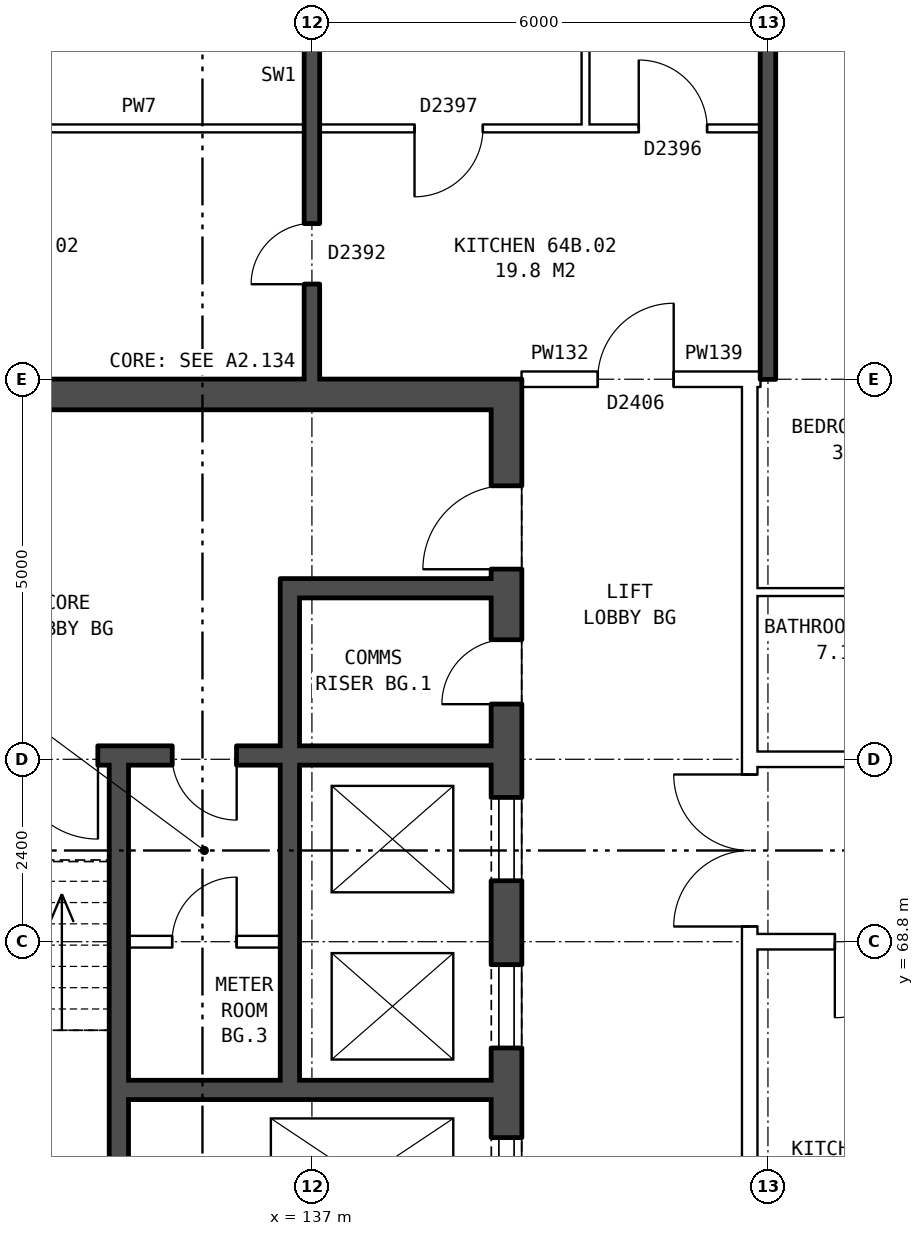
"""IFC4 building model, lengths in metres.
Left out: names, types, materials, properties, quantities, classifications, styles, units other than length and angle.
Written with IfcOpenShell. Run it as: python <this file> out.ifc"""

import sys

from ifc_helpers import new_model, si_unit, direction, frame, frame_2d, origin, place, context, subcontext, project, spatial, rectangle, extrude, element, fill, save


model = new_model("IFC4")
c1 = context("Model", 3, precision=1e-05, world=origin(), true_north=direction((0.0, 1.0)))
c2 = subcontext(c1, "Body", "Model", "MODEL_VIEW")
j1 = project(units=[si_unit("LENGTHUNIT", "METRE"), si_unit("PLANEANGLEUNIT", "RADIAN")], contexts=[c1])
p1 = place(None, origin())
s1 = spatial("IfcSite", under=j1, at=p1, CompositionType="ELEMENT")
p2 = place(p1, origin())
s2 = spatial("IfcBuilding", under=s1, at=p2, CompositionType="ELEMENT")
p3 = place(p2, frame((0.0, 0.0, 227.6)))
s3 = spatial("IfcBuildingStorey", under=s2, at=p3, CompositionType="ELEMENT", Elevation=227.6)
p4 = place(p3, frame((139.56, 63.8, 0.0), z_axis=(0.0, 0.0, 1.0), x_axis=(0.0, 1.0, 0.0)))
e1 = element("IfcWall", 1, at=p4, inside=s3, PredefinedType="SHEAR", context=c2, shape_type="SweptSolid", body=[
    extrude(rectangle(XDim=12.4, YDim=0.4, at=frame_2d((6.2, 0.0))), origin(), (0.0, 0.0, 1.0), 2.85),
])
p5 = place(p4, frame((1.325, 0.0, 0.0)))
e2 = element("IfcOpeningElement", 2, at=p5, cuts=e1, PredefinedType="OPENING", context=c2, shape_type="SweptSolid", body=[
    extrude(rectangle(XDim=1.1, YDim=2.1, at=frame_2d((0.55, 1.05))), frame((0.0, 0.21, 0.0), z_axis=(0.0, -1.0, 0.0), x_axis=(1.0, 0.0, 0.0)), (0.0, 0.0, 1.0), 0.42),
])
p6 = place(p4, frame((3.6, 0.0, 0.0)))
e3 = element("IfcOpeningElement", 3, at=p6, cuts=e1, PredefinedType="OPENING", context=c2, shape_type="SweptSolid", body=[
    extrude(rectangle(XDim=1.1, YDim=2.1, at=frame_2d((0.55, 1.05))), frame((0.0, 0.21, 0.0), z_axis=(0.0, -1.0, 0.0), x_axis=(1.0, 0.0, 0.0)), (0.0, 0.0, 1.0), 0.42),
])
p7 = place(p4, frame((5.8, 0.0, 0.0)))
e4 = element("IfcOpeningElement", 4, at=p7, cuts=e1, PredefinedType="OPENING", context=c2, shape_type="SweptSolid", body=[
    extrude(rectangle(XDim=1.1, YDim=2.1, at=frame_2d((0.55, 1.05))), frame((0.0, 0.21, 0.0), z_axis=(0.0, -1.0, 0.0), x_axis=(1.0, 0.0, 0.0)), (0.0, 0.0, 1.0), 0.42),
])
p8 = place(p4, frame((9.9, 0.0, 0.0)))
e5 = element("IfcOpeningElement", 5, at=p8, cuts=e1, PredefinedType="OPENING", context=c2, shape_type="SweptSolid", body=[
    extrude(rectangle(XDim=1.1, YDim=2.1, at=frame_2d((0.55, 1.05))), frame((0.0, 0.21, 0.0), z_axis=(0.0, -1.0, 0.0), x_axis=(1.0, 0.0, 0.0)), (0.0, 0.0, 1.0), 0.42),
])
p9 = place(p4, frame((8.125, 0.0, 0.0)))
e6 = element("IfcOpeningElement", 6, at=p9, cuts=e1, PredefinedType="OPENING", context=c2, shape_type="SweptSolid", body=[
    extrude(rectangle(XDim=0.85, YDim=2.1, at=frame_2d((0.425, 1.05))), frame((0.0, 0.21, 0.0), z_axis=(0.0, -1.0, 0.0), x_axis=(1.0, 0.0, 0.0)), (0.0, 0.0, 1.0), 0.42),
])
p10 = place(p3, frame((139.36, 76.0, 0.0), z_axis=(0.0, 0.0, 1.0), x_axis=(-1.0, 0.0, 0.0)))
e7 = element("IfcWall", 7, at=p10, inside=s3, PredefinedType="SHEAR", context=c2, shape_type="SweptSolid", body=[
    extrude(rectangle(XDim=7.6, YDim=0.4, at=frame_2d((3.8, 0.0))), origin(), (0.0, 0.0, 1.0), 2.85),
])
p11 = place(p3, frame((139.36, 66.85, 0.0), z_axis=(0.0, 0.0, 1.0), x_axis=(-1.0, 0.0, 0.0)))
e8 = element("IfcWall", 8, at=p11, inside=s3, PredefinedType="SHEAR", context=c2, shape_type="SweptSolid", body=[
    extrude(rectangle(XDim=4.775, YDim=0.25, at=frame_2d((2.388, 0.0))), origin(), (0.0, 0.0, 1.0), 2.85),
])
p12 = place(p3, frame((136.585, 68.8, 0.0), z_axis=(0.0, 0.0, 1.0), x_axis=(-1.0, 0.0, 0.0)))
e9 = element("IfcWall", 9, at=p12, inside=s3, PredefinedType="PARTITIONING", context=c2, shape_type="SweptSolid", body=[
    extrude(rectangle(XDim=2.0, YDim=0.15, at=frame_2d((1.0, 0.0))), origin(), (0.0, 0.0, 1.0), 2.85),
])
p13 = place(p12, frame((0.575, 0.0, 0.0)))
e10 = element("IfcOpeningElement", 10, at=p13, cuts=e9, PredefinedType="OPENING", context=c2, shape_type="SweptSolid", body=[
    extrude(rectangle(XDim=0.85, YDim=2.1, at=frame_2d((0.425, 1.05))), frame((0.0, 0.085, 0.0), z_axis=(0.0, -1.0, 0.0), x_axis=(1.0, 0.0, 0.0)), (0.0, 0.0, 1.0), 0.17),
])
p14 = place(p3, frame((139.36, 71.25, 0.0), z_axis=(0.0, 0.0, 1.0), x_axis=(-1.0, 0.0, 0.0)))
e11 = element("IfcWall", 11, at=p14, inside=s3, PredefinedType="SHEAR", context=c2, shape_type="SweptSolid", body=[
    extrude(rectangle(XDim=7.6, YDim=0.25, at=frame_2d((3.8, 0.0))), origin(), (0.0, 0.0, 1.0), 2.85),
])
p15 = place(p14, frame((5.175, 0.0, 0.0)))
e12 = element("IfcOpeningElement", 12, at=p15, cuts=e11, PredefinedType="OPENING", context=c2, shape_type="SweptSolid", body=[
    extrude(rectangle(XDim=1.1, YDim=2.1, at=frame_2d((0.55, 1.05))), frame((0.0, 0.135, 0.0), z_axis=(0.0, -1.0, 0.0), x_axis=(1.0, 0.0, 0.0)), (0.0, 0.0, 1.0), 0.27),
])
p16 = place(p14, frame((3.35, 0.0, 0.0)))
e13 = element("IfcOpeningElement", 13, at=p16, cuts=e11, PredefinedType="OPENING", context=c2, shape_type="SweptSolid", body=[
    extrude(rectangle(XDim=0.85, YDim=2.1, at=frame_2d((0.425, 1.05))), frame((0.0, 0.135, 0.0), z_axis=(0.0, -1.0, 0.0), x_axis=(1.0, 0.0, 0.0)), (0.0, 0.0, 1.0), 0.27),
])
p17 = place(p3, frame((139.36, 73.45, 0.0), z_axis=(0.0, 0.0, 1.0), x_axis=(-1.0, 0.0, 0.0)))
e14 = element("IfcWall", 14, at=p17, inside=s3, PredefinedType="SHEAR", context=c2, shape_type="SweptSolid", body=[
    extrude(rectangle(XDim=2.525, YDim=0.25, at=frame_2d((1.263, 0.0))), origin(), (0.0, 0.0, 1.0), 2.85),
])
p18 = place(p3, frame((136.71, 66.975, 0.0), z_axis=(0.0, 0.0, 1.0), x_axis=(0.0, 1.0, 0.0)))
e15 = element("IfcWall", 15, at=p18, inside=s3, PredefinedType="SHEAR", context=c2, shape_type="SweptSolid", body=[
    extrude(rectangle(XDim=4.15, YDim=0.25, at=frame_2d((2.075, 0.0))), origin(), (0.0, 0.0, 1.0), 2.85),
])
p19 = place(p3, frame((136.71, 71.375, 0.0), z_axis=(0.0, 0.0, 1.0), x_axis=(0.0, 1.0, 0.0)))
e16 = element("IfcWall", 16, at=p19, inside=s3, PredefinedType="SHEAR", context=c2, shape_type="SweptSolid", body=[
    extrude(rectangle(XDim=2.2, YDim=0.25, at=frame_2d((1.1, 0.0))), origin(), (0.0, 0.0, 1.0), 2.85),
])
p20 = place(p3, frame((134.46, 64.2, 0.0), z_axis=(0.0, 0.0, 1.0), x_axis=(0.0, 1.0, 0.0)))
e17 = element("IfcWall", 17, at=p20, inside=s3, PredefinedType="SHEAR", context=c2, shape_type="SweptSolid", body=[
    extrude(rectangle(XDim=6.925, YDim=0.25, at=frame_2d((3.462, 0.0))), origin(), (0.0, 0.0, 1.0), 2.85),
])
p21 = place(p3, frame((142.76, 63.9, 0.0), z_axis=(0.0, 0.0, 1.0), x_axis=(0.0, 1.0, 0.0)))
e18 = element("IfcWall", 18, at=p21, inside=s3, PredefinedType="PARTITIONING", context=c2, shape_type="SweptSolid", body=[
    extrude(rectangle(XDim=12.2, YDim=0.2, at=frame_2d((6.1, 0.0))), origin(), (0.0, 0.0, 1.0), 2.85),
])
p22 = place(p21, frame((5.1, 0.0, 0.0)))
e19 = element("IfcOpeningElement", 19, at=p22, cuts=e18, PredefinedType="OPENING", context=c2, shape_type="SweptSolid", body=[
    extrude(rectangle(XDim=2.0, YDim=2.1, at=frame_2d((1.0, 1.05))), frame((0.0, 0.11, 0.0), z_axis=(0.0, -1.0, 0.0), x_axis=(1.0, 0.0, 0.0)), (0.0, 0.0, 1.0), 0.22),
])
p23 = place(p3, frame((142.76, 68.8, 0.0), z_axis=(0.0, 0.0, 1.0), x_axis=(1.0, 0.0, 0.0)))
e20 = element("IfcWall", 20, at=p23, inside=s3, PredefinedType="PARTITIONING", context=c2, shape_type="SweptSolid", body=[
    extrude(rectangle(XDim=14.48, YDim=0.2, at=frame_2d((7.24, 0.0))), origin(), (0.0, 0.0, 1.0), 2.85),
])
p24 = place(p23, frame((1.12, 0.0, 0.0)))
e21 = element("IfcOpeningElement", 21, at=p24, cuts=e20, PredefinedType="OPENING", context=c2, shape_type="SweptSolid", body=[
    extrude(rectangle(XDim=1.0, YDim=2.1, at=frame_2d((0.5, 1.05))), frame((0.0, 0.11, 0.0), z_axis=(0.0, -1.0, 0.0), x_axis=(1.0, 0.0, 0.0)), (0.0, 0.0, 1.0), 0.22),
])
p25 = place(p23, frame((10.24, 0.0, 0.0)))
e22 = element("IfcOpeningElement", 22, at=p25, cuts=e20, PredefinedType="OPENING", context=c2, shape_type="SweptSolid", body=[
    extrude(rectangle(XDim=1.0, YDim=2.1, at=frame_2d((0.5, 1.05))), frame((0.0, 0.11, 0.0), z_axis=(0.0, -1.0, 0.0), x_axis=(1.0, 0.0, 0.0)), (0.0, 0.0, 1.0), 0.22),
])
p26 = place(p3, frame((142.76, 71.2, 0.0), z_axis=(0.0, 0.0, 1.0), x_axis=(1.0, 0.0, 0.0)))
e23 = element("IfcWall", 23, at=p26, inside=s3, PredefinedType="PARTITIONING", context=c2, shape_type="SweptSolid", body=[
    extrude(rectangle(XDim=14.48, YDim=0.2, at=frame_2d((7.24, 0.0))), origin(), (0.0, 0.0, 1.0), 2.85),
])
p27 = place(p26, frame((4.24, 0.0, 0.0)))
e24 = element("IfcOpeningElement", 24, at=p27, cuts=e23, PredefinedType="OPENING", context=c2, shape_type="SweptSolid", body=[
    extrude(rectangle(XDim=1.0, YDim=2.1, at=frame_2d((0.5, 1.05))), frame((0.0, 0.11, 0.0), z_axis=(0.0, -1.0, 0.0), x_axis=(1.0, 0.0, 0.0)), (0.0, 0.0, 1.0), 0.22),
])
p28 = place(p26, frame((10.24, 0.0, 0.0)))
e25 = element("IfcOpeningElement", 25, at=p28, cuts=e23, PredefinedType="OPENING", context=c2, shape_type="SweptSolid", body=[
    extrude(rectangle(XDim=1.0, YDim=2.1, at=frame_2d((0.5, 1.05))), frame((0.0, 0.11, 0.0), z_axis=(0.0, -1.0, 0.0), x_axis=(1.0, 0.0, 0.0)), (0.0, 0.0, 1.0), 0.22),
])
p29 = place(p3, frame((142.76, 73.4, 0.0), z_axis=(0.0, 0.0, 1.0), x_axis=(1.0, 0.0, 0.0)))
e26 = element("IfcWall", 26, at=p29, inside=s3, PredefinedType="PARTITIONING", context=c2, shape_type="SweptSolid", body=[
    extrude(rectangle(XDim=3.24, YDim=0.1, at=frame_2d((1.62, 0.0))), origin(), (0.0, 0.0, 1.0), 2.85),
])
p30 = place(p3, frame((139.76, 76.2, 0.0), z_axis=(0.0, 0.0, 1.0), x_axis=(1.0, 0.0, 0.0)))
e27 = element("IfcWall", 27, at=p30, inside=s3, PredefinedType="PARTITIONING", context=c2, shape_type="SweptSolid", body=[
    extrude(rectangle(XDim=3.0, YDim=0.2, at=frame_2d((1.5, 0.0))), origin(), (0.0, 0.0, 1.0), 2.85),
])
p31 = place(p30, frame((1.0, 0.0, 0.0)))
e28 = element("IfcOpeningElement", 28, at=p31, cuts=e27, PredefinedType="OPENING", context=c2, shape_type="SweptSolid", body=[
    extrude(rectangle(XDim=1.0, YDim=2.1, at=frame_2d((0.5, 1.05))), frame((0.0, 0.11, 0.0), z_axis=(0.0, -1.0, 0.0), x_axis=(1.0, 0.0, 0.0)), (0.0, 0.0, 1.0), 0.22),
])
p32 = place(p3, frame((142.76, 76.2, 0.0), z_axis=(0.0, 0.0, 1.0), x_axis=(1.0, 0.0, 0.0)))
e29 = element("IfcWall", 29, at=p32, inside=s3, PredefinedType="PARTITIONING", context=c2, shape_type="SweptSolid", body=[
    extrude(rectangle(XDim=0.14, YDim=0.2, at=frame_2d((0.07, 0.0))), origin(), (0.0, 0.0, 1.0), 2.85),
])
p33 = place(p3, frame((131.1, 79.5, 0.0), z_axis=(0.0, 0.0, 1.0), x_axis=(1.0, 0.0, 0.0)))
e30 = element("IfcWall", 30, at=p33, inside=s3, PredefinedType="PARTITIONING", context=c2, shape_type="SweptSolid", body=[
    extrude(rectangle(XDim=11.8, YDim=0.1, at=frame_2d((5.9, 0.0))), origin(), (0.0, 0.0, 1.0), 2.85),
])
p34 = place(p33, frame((7.25, 0.0, 0.0)))
e31 = element("IfcOpeningElement", 31, at=p34, cuts=e30, PredefinedType="OPENING", context=c2, shape_type="SweptSolid", body=[
    extrude(rectangle(XDim=0.9, YDim=2.1, at=frame_2d((0.45, 1.05))), frame((0.0, 0.06, 0.0), z_axis=(0.0, -1.0, 0.0), x_axis=(1.0, 0.0, 0.0)), (0.0, 0.0, 1.0), 0.12),
])
p35 = place(p33, frame((10.2, 0.0, 0.0)))
e32 = element("IfcOpeningElement", 32, at=p35, cuts=e30, PredefinedType="OPENING", context=c2, shape_type="SweptSolid", body=[
    extrude(rectangle(XDim=0.9, YDim=2.1, at=frame_2d((0.45, 1.05))), frame((0.0, 0.06, 0.0), z_axis=(0.0, -1.0, 0.0), x_axis=(1.0, 0.0, 0.0)), (0.0, 0.0, 1.0), 0.12),
])
p36 = place(p3, frame((137.0, 76.2, 0.0), z_axis=(0.0, 0.0, 1.0), x_axis=(0.0, 1.0, 0.0)))
e33 = element("IfcWall", 33, at=p36, inside=s3, PredefinedType="SOLIDWALL", context=c2, shape_type="SweptSolid", body=[
    extrude(rectangle(XDim=9.44, YDim=0.2, at=frame_2d((4.72, 0.0))), origin(), (0.0, 0.0, 1.0), 2.85),
])
p37 = place(p36, frame((5.92, 0.0, 0.0)))
e34 = element("IfcOpeningElement", 34, at=p37, cuts=e33, PredefinedType="OPENING", context=c2, shape_type="SweptSolid", body=[
    extrude(rectangle(XDim=0.9, YDim=2.1, at=frame_2d((0.45, 1.05))), frame((0.0, 0.11, 0.0), z_axis=(0.0, -1.0, 0.0), x_axis=(1.0, 0.0, 0.0)), (0.0, 0.0, 1.0), 0.22),
])
p38 = place(p36, frame((1.25, 0.0, 0.0)))
e35 = element("IfcOpeningElement", 35, at=p38, cuts=e33, PredefinedType="OPENING", context=c2, shape_type="SweptSolid", body=[
    extrude(rectangle(XDim=0.8, YDim=2.1, at=frame_2d((0.4, 1.05))), frame((0.0, 0.11, 0.0), z_axis=(0.0, -1.0, 0.0), x_axis=(1.0, 0.0, 0.0)), (0.0, 0.0, 1.0), 0.22),
])
p39 = place(p3, frame((140.6, 79.55, 0.0), z_axis=(0.0, 0.0, 1.0), x_axis=(0.0, 1.0, 0.0)))
e36 = element("IfcWall", 36, at=p39, inside=s3, PredefinedType="PARTITIONING", context=c2, shape_type="SweptSolid", body=[
    extrude(rectangle(XDim=2.7, YDim=0.1, at=frame_2d((1.35, 0.0))), origin(), (0.0, 0.0, 1.0), 2.85),
])
p40 = place(p3, frame((143.0, 76.2, 0.0), z_axis=(0.0, 0.0, 1.0), x_axis=(0.0, 1.0, 0.0)))
e37 = element("IfcWall", 37, at=p40, inside=s3, PredefinedType="SOLIDWALL", context=c2, shape_type="SweptSolid", body=[
    extrude(rectangle(XDim=9.44, YDim=0.2, at=frame_2d((4.72, 0.0))), origin(), (0.0, 0.0, 1.0), 2.85),
])
p41 = place(p5, origin())
e38 = element("IfcDoor", 38, at=p41, inside=s3, OperationType="DOUBLE_DOOR_SLIDING", PredefinedType="DOOR", context=c2, shape_type="SweptSolid", body=[
    extrude(rectangle(XDim=1.1, YDim=2.1, at=frame_2d((0.55, 1.05))), frame((0.0, 0.185, 0.0), z_axis=(0.0, -1.0, 0.0), x_axis=(1.0, 0.0, 0.0)), (0.0, 0.0, 1.0), 0.05),
])
fill(e2, e38)
p42 = place(p6, origin())
e39 = element("IfcDoor", 39, at=p42, inside=s3, OperationType="DOUBLE_DOOR_SLIDING", PredefinedType="DOOR", context=c2, shape_type="SweptSolid", body=[
    extrude(rectangle(XDim=1.1, YDim=2.1, at=frame_2d((0.55, 1.05))), frame((0.0, 0.185, 0.0), z_axis=(0.0, -1.0, 0.0), x_axis=(1.0, 0.0, 0.0)), (0.0, 0.0, 1.0), 0.05),
])
fill(e3, e39)
p43 = place(p7, origin())
e40 = element("IfcDoor", 40, at=p43, inside=s3, OperationType="DOUBLE_DOOR_SLIDING", PredefinedType="DOOR", context=c2, shape_type="SweptSolid", body=[
    extrude(rectangle(XDim=1.1, YDim=2.1, at=frame_2d((0.55, 1.05))), frame((0.0, 0.185, 0.0), z_axis=(0.0, -1.0, 0.0), x_axis=(1.0, 0.0, 0.0)), (0.0, 0.0, 1.0), 0.05),
])
fill(e4, e40)
p44 = place(p8, origin())
e41 = element("IfcDoor", 41, at=p44, inside=s3, OperationType="SINGLE_SWING_LEFT", PredefinedType="DOOR", context=c2, shape_type="SweptSolid", body=[
    extrude(rectangle(XDim=1.1, YDim=2.1, at=frame_2d((0.55, 1.05))), frame((0.0, 0.185, 0.0), z_axis=(0.0, -1.0, 0.0), x_axis=(1.0, 0.0, 0.0)), (0.0, 0.0, 1.0), 0.05),
])
fill(e5, e41)
p45 = place(p15, origin())
e42 = element("IfcDoor", 42, at=p45, inside=s3, OperationType="SINGLE_SWING_LEFT", PredefinedType="DOOR", context=c2, shape_type="SweptSolid", body=[
    extrude(rectangle(XDim=1.1, YDim=2.1, at=frame_2d((0.55, 1.05))), frame((0.0, 0.025, 0.0), z_axis=(0.0, -1.0, 0.0), x_axis=(1.0, 0.0, 0.0)), (0.0, 0.0, 1.0), 0.05),
])
fill(e12, e42)
p46 = place(p9, origin())
e43 = element("IfcDoor", 43, at=p46, inside=s3, OperationType="SINGLE_SWING_LEFT", PredefinedType="DOOR", context=c2, shape_type="SweptSolid", body=[
    extrude(rectangle(XDim=0.85, YDim=2.1, at=frame_2d((0.425, 1.05))), frame((0.0, 0.185, 0.0), z_axis=(0.0, -1.0, 0.0), x_axis=(1.0, 0.0, 0.0)), (0.0, 0.0, 1.0), 0.05),
])
fill(e6, e43)
p47 = place(p16, origin())
e44 = element("IfcDoor", 44, at=p47, inside=s3, OperationType="SINGLE_SWING_LEFT", PredefinedType="DOOR", context=c2, shape_type="SweptSolid", body=[
    extrude(rectangle(XDim=0.85, YDim=2.1, at=frame_2d((0.425, 1.05))), frame((0.0, 0.025, 0.0), z_axis=(0.0, -1.0, 0.0), x_axis=(1.0, 0.0, 0.0)), (0.0, 0.0, 1.0), 0.05),
])
fill(e13, e44)
p48 = place(p13, frame((0.85, 0.0, 0.0), z_axis=(0.0, 0.0, 1.0), x_axis=(-1.0, 0.0, 0.0)))
e45 = element("IfcDoor", 45, at=p48, inside=s3, OperationType="SINGLE_SWING_RIGHT", PredefinedType="DOOR", context=c2, shape_type="SweptSolid", body=[
    extrude(rectangle(XDim=0.85, YDim=2.1, at=frame_2d((0.425, 1.05))), frame((0.0, 0.025, 0.0), z_axis=(0.0, -1.0, 0.0), x_axis=(1.0, 0.0, 0.0)), (0.0, 0.0, 1.0), 0.05),
])
fill(e10, e45)
p49 = place(p22, origin())
e46 = element("IfcDoor", 46, at=p49, inside=s3, OperationType="DOUBLE_DOOR_SINGLE_SWING", PredefinedType="DOOR", context=c2, shape_type="SweptSolid", body=[
    extrude(rectangle(XDim=2.0, YDim=2.1, at=frame_2d((1.0, 1.05))), frame((0.0, 0.025, 0.0), z_axis=(0.0, -1.0, 0.0), x_axis=(1.0, 0.0, 0.0)), (0.0, 0.0, 1.0), 0.05),
])
fill(e19, e46)
p50 = place(p31, origin())
e47 = element("IfcDoor", 47, at=p50, inside=s3, OperationType="SINGLE_SWING_RIGHT", PredefinedType="DOOR", context=c2, shape_type="SweptSolid", body=[
    extrude(rectangle(XDim=1.0, YDim=2.1, at=frame_2d((0.5, 1.05))), frame((0.0, 0.025, 0.0), z_axis=(0.0, -1.0, 0.0), x_axis=(1.0, 0.0, 0.0)), (0.0, 0.0, 1.0), 0.05),
])
fill(e28, e47)
p51 = place(p34, frame((0.9, 0.0, 0.0), z_axis=(0.0, 0.0, 1.0), x_axis=(-1.0, 0.0, 0.0)))
e48 = element("IfcDoor", 48, at=p51, inside=s3, OperationType="SINGLE_SWING_RIGHT", PredefinedType="DOOR", context=c2, shape_type="SweptSolid", body=[
    extrude(rectangle(XDim=0.9, YDim=2.1, at=frame_2d((0.45, 1.05))), frame((0.0, 0.025, 0.0), z_axis=(0.0, -1.0, 0.0), x_axis=(1.0, 0.0, 0.0)), (0.0, 0.0, 1.0), 0.05),
])
fill(e31, e48)
p52 = place(p38, origin())
e49 = element("IfcDoor", 49, at=p52, inside=s3, OperationType="SINGLE_SWING_LEFT", PredefinedType="DOOR", context=c2, shape_type="SweptSolid", body=[
    extrude(rectangle(XDim=0.8, YDim=2.1, at=frame_2d((0.4, 1.05))), frame((0.0, 0.025, 0.0), z_axis=(0.0, -1.0, 0.0), x_axis=(1.0, 0.0, 0.0)), (0.0, 0.0, 1.0), 0.05),
])
fill(e35, e49)
p53 = place(p35, origin())
e50 = element("IfcDoor", 50, at=p53, inside=s3, OperationType="SINGLE_SWING_LEFT", PredefinedType="DOOR", context=c2, shape_type="SweptSolid", body=[
    extrude(rectangle(XDim=0.9, YDim=2.1, at=frame_2d((0.45, 1.05))), frame((0.0, 0.025, 0.0), z_axis=(0.0, -1.0, 0.0), x_axis=(1.0, 0.0, 0.0)), (0.0, 0.0, 1.0), 0.05),
])
fill(e32, e50)
p54 = place(p24, frame((1.0, 0.0, 0.0), z_axis=(0.0, 0.0, 1.0), x_axis=(-1.0, 0.0, 0.0)))
e51 = element("IfcDoor", 51, at=p54, inside=s3, OperationType="SINGLE_SWING_RIGHT", PredefinedType="DOOR", context=c2, shape_type="SweptSolid", body=[
    extrude(rectangle(XDim=1.0, YDim=2.1, at=frame_2d((0.5, 1.05))), frame((0.0, 0.025, 0.0), z_axis=(0.0, -1.0, 0.0), x_axis=(1.0, 0.0, 0.0)), (0.0, 0.0, 1.0), 0.05),
])
fill(e21, e51)
save(model, sys.argv[1])
